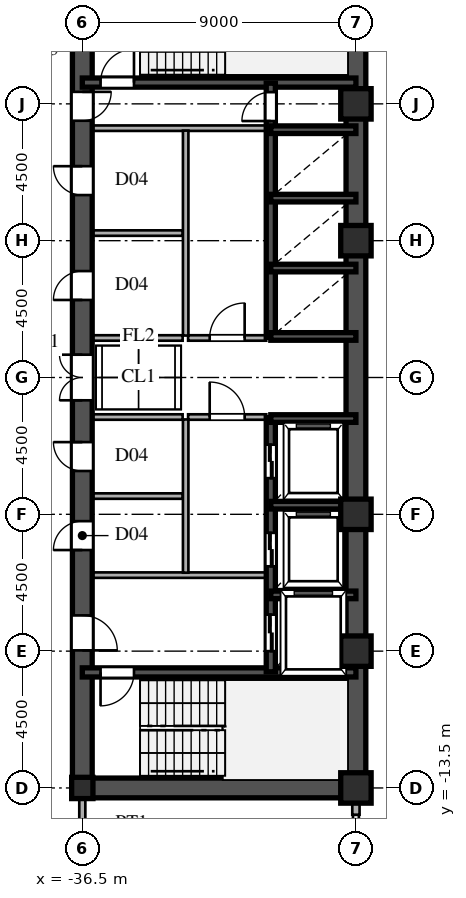
"""IFC4 building model, lengths in metres.
Left out: names, types, materials, properties, quantities, classifications, styles, units other than length and angle.
Written with IfcOpenShell. Run it as: python <this file> out.ifc"""

import sys

from ifc_helpers import new_model, si_unit, direction, frame, frame_2d, origin, origin_2d, place, context, subcontext, project, spatial, rectangle, hollow_rectangle, i_section, extrude, source, transform, mapped, element, fill, save


model = new_model("IFC4")
c1 = context("Model", 3, precision=1e-05, world=origin(), true_north=direction((0.0, 1.0)))
c2 = subcontext(c1, "Body", "Model", "MODEL_VIEW")
j1 = project(units=[si_unit("LENGTHUNIT", "METRE"), si_unit("PLANEANGLEUNIT", "RADIAN")], contexts=[c1])
p1 = place(None, origin())
s1 = spatial("IfcSite", under=j1, at=p1, CompositionType="ELEMENT")
p2 = place(p1, origin())
s2 = spatial("IfcBuilding", under=s1, at=p2, CompositionType="ELEMENT")
p3 = place(p2, frame((0.0, 0.0, 117.6)))
s3 = spatial("IfcBuildingStorey", under=s2, at=p3, CompositionType="ELEMENT", Elevation=117.6)
m1 = source(origin(), c2, "Body", "SweptSolid", [
    extrude(hollow_rectangle(XDim=1.0, YDim=1.0, WallThickness=0.042, at=origin_2d()), origin(), (0.0, 0.0, 1.0), 3.6),
])
for number, where, z_axis, x_axis in (
    (1, (-27.5, -13.5, 0.0), (0.0, 0.0, 1.0), (1.0, 0.0, 0.0)),
    (2, (-27.5, -9.0, 0.0), (0.0, 0.0, 1.0), (1.0, 0.0, 0.0)),
    (3, (-27.5, -4.5, 0.0), (0.0, 0.0, 1.0), (1.0, 0.0, 0.0)),
    (4, (-27.5, 4.5, 0.0), (0.0, 0.0, 1.0), (1.0, 0.0, 0.0)),
    (5, (-27.5, 9.0, 0.0), (0.0, 0.0, 1.0), (1.0, 0.0, 0.0)),
):
    element("IfcColumn", number, at=place(p3, frame(where, z_axis=z_axis, x_axis=x_axis)), inside=s3, PredefinedType="COLUMN", context=c2, shape_type="MappedRepresentation", body=[
        mapped(m1, transform((0.0, 0.0, 0.0), scale=1.0)),
    ])
m2 = source(origin(), c2, "Body", "SweptSolid", [
    extrude(i_section(OverallWidth=0.7, OverallDepth=0.7, WebThickness=0.028, FlangeThickness=0.045, at=origin_2d()), origin(), (0.0, 0.0, 1.0), 3.6),
])
p4 = place(p3, frame((-36.5, -13.5, 0.0), z_axis=(0.0, 0.0, 1.0), x_axis=(1.0, 0.0, 0.0)))
e6 = element("IfcColumn", 6, at=p4, inside=s3, PredefinedType="COLUMN", context=c2, shape_type="MappedRepresentation", body=[
    mapped(m2, transform((0.0, 0.0, 0.0), scale=1.0)),
])
p5 = place(p3, frame((-27.5, -14.38, 0.0), z_axis=(0.0, 0.0, 1.0), x_axis=(0.0, 1.0, 0.0)))
e7 = element("IfcWall", 7, at=p5, inside=s3, PredefinedType="SOLIDWALL", context=c2, shape_type="SweptSolid", body=[
    extrude(rectangle(XDim=0.55, YDim=0.24, at=frame_2d((0.275, 0.0))), origin(), (0.0, 0.0, 1.0), 2.88),
])
for number, where, z_axis, x_axis in (
    (8, (-27.5, -13.5, 0.0), (0.0, 0.0, 1.0), (0.0, 1.0, 0.0)),
    (9, (-27.5, 1.3, 0.0), (0.0, 0.0, 1.0), (0.0, 1.0, 0.0)),
):
    element("IfcWall", number, at=place(p3, frame(where, z_axis=z_axis, x_axis=x_axis)), inside=s3, PredefinedType="SHEAR", context=c2, shape_type="SweptSolid", body=[
        extrude(rectangle(XDim=12.2, YDim=0.65, at=frame_2d((6.1, 0.0))), origin(), (0.0, 0.0, 1.0), 3.38),
    ])
p6 = place(p3, frame((-27.5, -1.3, 0.0), z_axis=(0.0, 0.0, 1.0), x_axis=(0.0, 1.0, 0.0)))
e10 = element("IfcWall", 10, at=p6, inside=s3, PredefinedType="SHEAR", context=c2, shape_type="SweptSolid", body=[
    extrude(rectangle(XDim=2.6, YDim=0.65, at=frame_2d((1.3, 0.0))), origin(), (0.0, 0.0, 1.0), 3.38),
])
p7 = place(p3, frame((-36.5, -13.5, 0.0), z_axis=(0.0, 0.0, 1.0), x_axis=(1.0, 0.0, 0.0)))
e11 = element("IfcWall", 11, at=p7, inside=s3, PredefinedType="SHEAR", context=c2, shape_type="SweptSolid", body=[
    extrude(rectangle(XDim=9.0, YDim=0.65, at=frame_2d((4.5, 0.0))), origin(), (0.0, 0.0, 1.0), 3.38),
])
p8 = place(p3, frame((-36.5, -13.65, 0.0), z_axis=(0.0, 0.0, 1.0), x_axis=(0.0, 1.0, 0.0)))
e12 = element("IfcWall", 12, at=p8, inside=s3, PredefinedType="SHEAR", context=c2, shape_type="SweptSolid", body=[
    extrude(rectangle(XDim=7.15, YDim=0.65, at=frame_2d((3.575, 0.0))), origin(), (0.0, 0.0, 1.0), 3.38),
])
p9 = place(p8, frame((4.675, 0.0, 0.0)))
e13 = element("IfcOpeningElement", 13, at=p9, cuts=e12, PredefinedType="OPENING", context=c2, shape_type="SweptSolid", body=[
    extrude(rectangle(XDim=1.15, YDim=2.2, at=frame_2d((0.575, 1.1))), frame((0.0, 0.335, 0.0), z_axis=(0.0, -1.0, 0.0), x_axis=(1.0, 0.0, 0.0)), (0.0, 0.0, 1.0), 0.67),
])
p10 = place(p3, frame((-36.5, -1.3, 0.0), z_axis=(0.0, 0.0, 1.0), x_axis=(0.0, 1.0, 0.0)))
e14 = element("IfcWall", 14, at=p10, inside=s3, PredefinedType="SHEAR", context=c2, shape_type="SweptSolid", body=[
    extrude(rectangle(XDim=2.6, YDim=0.65, at=frame_2d((1.3, 0.0))), origin(), (0.0, 0.0, 1.0), 3.38),
])
p11 = place(p10, frame((0.55, 0.0, 0.0)))
e15 = element("IfcOpeningElement", 15, at=p11, cuts=e14, PredefinedType="OPENING", context=c2, shape_type="SweptSolid", body=[
    extrude(rectangle(XDim=1.5, YDim=2.3, at=frame_2d((0.75, 1.15))), frame((0.0, 0.335, 0.0), z_axis=(0.0, -1.0, 0.0), x_axis=(1.0, 0.0, 0.0)), (0.0, 0.0, 1.0), 0.67),
])
p12 = place(p3, frame((-36.5, 8.2, 0.0), z_axis=(0.0, 0.0, 1.0), x_axis=(0.0, 1.0, 0.0)))
e16 = element("IfcWall", 16, at=p12, inside=s3, PredefinedType="SHEAR", context=c2, shape_type="SweptSolid", body=[
    extrude(rectangle(XDim=5.45, YDim=0.65, at=frame_2d((2.725, 0.0))), origin(), (0.0, 0.0, 1.0), 3.38),
])
p13 = place(p12, frame((0.245, 0.0, 0.0)))
e17 = element("IfcOpeningElement", 17, at=p13, cuts=e16, PredefinedType="OPENING", context=c2, shape_type="SweptSolid", body=[
    extrude(rectangle(XDim=0.95, YDim=2.15, at=frame_2d((0.475, 1.075))), frame((0.0, 0.335, 0.0), z_axis=(0.0, -1.0, 0.0), x_axis=(1.0, 0.0, 0.0)), (0.0, 0.0, 1.0), 0.67),
])
p14 = place(p3, frame((-36.5, -6.5, 0.0), z_axis=(0.0, 0.0, 1.0), x_axis=(0.0, 1.0, 0.0)))
e18 = element("IfcWall", 18, at=p14, inside=s3, PredefinedType="SHEAR", context=c2, shape_type="SweptSolid", body=[
    extrude(rectangle(XDim=2.6, YDim=0.65, at=frame_2d((1.3, 0.0))), origin(), (0.0, 0.0, 1.0), 3.38),
])
p15 = place(p14, frame((0.825, 0.0, 0.0)))
e19 = element("IfcOpeningElement", 19, at=p15, cuts=e18, PredefinedType="OPENING", context=c2, shape_type="SweptSolid", body=[
    extrude(rectangle(XDim=0.95, YDim=2.15, at=frame_2d((0.475, 1.075))), frame((0.0, 0.335, 0.0), z_axis=(0.0, -1.0, 0.0), x_axis=(1.0, 0.0, 0.0)), (0.0, 0.0, 1.0), 0.67),
])
p16 = place(p3, frame((-36.5, -3.9, 0.0), z_axis=(0.0, 0.0, 1.0), x_axis=(0.0, 1.0, 0.0)))
e20 = element("IfcWall", 20, at=p16, inside=s3, PredefinedType="SHEAR", context=c2, shape_type="SweptSolid", body=[
    extrude(rectangle(XDim=2.6, YDim=0.65, at=frame_2d((1.3, 0.0))), origin(), (0.0, 0.0, 1.0), 3.38),
])
p17 = place(p16, frame((0.825, 0.0, 0.0)))
e21 = element("IfcOpeningElement", 21, at=p17, cuts=e20, PredefinedType="OPENING", context=c2, shape_type="SweptSolid", body=[
    extrude(rectangle(XDim=0.95, YDim=2.15, at=frame_2d((0.475, 1.075))), frame((0.0, 0.335, 0.0), z_axis=(0.0, -1.0, 0.0), x_axis=(1.0, 0.0, 0.0)), (0.0, 0.0, 1.0), 0.67),
])
p18 = place(p3, frame((-36.5, 1.3, 0.0), z_axis=(0.0, 0.0, 1.0), x_axis=(0.0, 1.0, 0.0)))
e22 = element("IfcWall", 22, at=p18, inside=s3, PredefinedType="SHEAR", context=c2, shape_type="SweptSolid", body=[
    extrude(rectangle(XDim=3.45, YDim=0.65, at=frame_2d((1.725, 0.0))), origin(), (0.0, 0.0, 1.0), 3.38),
])
p19 = place(p18, frame((1.25, 0.0, 0.0)))
e23 = element("IfcOpeningElement", 23, at=p19, cuts=e22, PredefinedType="OPENING", context=c2, shape_type="SweptSolid", body=[
    extrude(rectangle(XDim=0.95, YDim=2.15, at=frame_2d((0.475, 1.075))), frame((0.0, 0.335, 0.0), z_axis=(0.0, -1.0, 0.0), x_axis=(1.0, 0.0, 0.0)), (0.0, 0.0, 1.0), 0.67),
])
p20 = place(p3, frame((-36.5, 4.75, 0.0), z_axis=(0.0, 0.0, 1.0), x_axis=(0.0, 1.0, 0.0)))
e24 = element("IfcWall", 24, at=p20, inside=s3, PredefinedType="SHEAR", context=c2, shape_type="SweptSolid", body=[
    extrude(rectangle(XDim=3.45, YDim=0.65, at=frame_2d((1.725, 0.0))), origin(), (0.0, 0.0, 1.0), 3.38),
])
p21 = place(p20, frame((1.25, 0.0, 0.0)))
e25 = element("IfcOpeningElement", 25, at=p21, cuts=e24, PredefinedType="OPENING", context=c2, shape_type="SweptSolid", body=[
    extrude(rectangle(XDim=0.95, YDim=2.15, at=frame_2d((0.475, 1.075))), frame((0.0, 0.335, 0.0), z_axis=(0.0, -1.0, 0.0), x_axis=(1.0, 0.0, 0.0)), (0.0, 0.0, 1.0), 0.67),
])
p22 = place(p3, frame((-36.5, -9.7, 0.0), z_axis=(0.0, 0.0, 1.0), x_axis=(1.0, 0.0, 0.0)))
e26 = element("IfcWall", 26, at=p22, inside=s3, PredefinedType="SHEAR", context=c2, shape_type="SweptSolid", body=[
    extrude(rectangle(XDim=9.0, YDim=0.3, at=frame_2d((4.5, 0.0))), origin(), (0.0, 0.0, 1.0), 3.38),
])
p23 = place(p22, frame((0.6, 0.0, 0.0)))
e27 = element("IfcOpeningElement", 27, at=p23, cuts=e26, PredefinedType="OPENING", context=c2, shape_type="SweptSolid", body=[
    extrude(rectangle(XDim=1.1, YDim=2.2, at=frame_2d((0.55, 1.1))), frame((0.0, 0.16, 0.0), z_axis=(0.0, -1.0, 0.0), x_axis=(1.0, 0.0, 0.0)), (0.0, 0.0, 1.0), 0.32),
])
p24 = place(p3, frame((-36.5, 9.7, 0.0), z_axis=(0.0, 0.0, 1.0), x_axis=(1.0, 0.0, 0.0)))
e28 = element("IfcWall", 28, at=p24, inside=s3, PredefinedType="SHEAR", context=c2, shape_type="SweptSolid", body=[
    extrude(rectangle(XDim=9.0, YDim=0.3, at=frame_2d((4.5, 0.0))), origin(), (0.0, 0.0, 1.0), 3.38),
])
p25 = place(p24, frame((0.6, 0.0, 0.0)))
e29 = element("IfcOpeningElement", 29, at=p25, cuts=e28, PredefinedType="OPENING", context=c2, shape_type="SweptSolid", body=[
    extrude(rectangle(XDim=1.1, YDim=2.2, at=frame_2d((0.55, 1.1))), frame((0.0, 0.16, 0.0), z_axis=(0.0, -1.0, 0.0), x_axis=(1.0, 0.0, 0.0)), (0.0, 0.0, 1.0), 0.32),
])
for number, where, z_axis, x_axis in (
    (30, (-30.3, -7.15, 0.0), (0.0, 0.0, 1.0), (1.0, 0.0, 0.0)),
    (31, (-30.3, -4.2, 0.0), (0.0, 0.0, 1.0), (1.0, 0.0, 0.0)),
    (32, (-30.3, -1.35, 0.0), (0.0, 0.0, 1.0), (1.0, 0.0, 0.0)),
    (33, (-30.3, 1.35, 0.0), (0.0, 0.0, 1.0), (1.0, 0.0, 0.0)),
    (34, (-30.3, 3.6, 0.0), (0.0, 0.0, 1.0), (1.0, 0.0, 0.0)),
    (35, (-30.3, 5.9, 0.0), (0.0, 0.0, 1.0), (1.0, 0.0, 0.0)),
    (36, (-30.3, 8.15, 0.0), (0.0, 0.0, 1.0), (1.0, 0.0, 0.0)),
):
    element("IfcWall", number, at=place(p3, frame(where, z_axis=z_axis, x_axis=x_axis)), inside=s3, PredefinedType="SHEAR", context=c2, shape_type="SweptSolid", body=[
        extrude(rectangle(XDim=2.8, YDim=0.25, at=frame_2d((1.4, 0.0))), origin(), (0.0, 0.0, 1.0), 3.38),
    ])
p26 = place(p3, frame((-30.3, -9.68, 0.0), z_axis=(0.0, 0.0, 1.0), x_axis=(0.0, 1.0, 0.0)))
e37 = element("IfcWall", 37, at=p26, inside=s3, PredefinedType="SHEAR", context=c2, shape_type="SweptSolid", body=[
    extrude(rectangle(XDim=2.56, YDim=0.3, at=frame_2d((1.28, 0.0))), origin(), (0.0, 0.0, 1.0), 3.38),
])
p27 = place(p26, frame((0.68, 0.0, 0.0)))
e38 = element("IfcOpeningElement", 38, at=p27, cuts=e37, PredefinedType="OPENING", context=c2, shape_type="SweptSolid", body=[
    extrude(rectangle(XDim=1.2, YDim=2.25, at=frame_2d((0.6, 1.125))), frame((0.0, 0.16, 0.0), z_axis=(0.0, -1.0, 0.0), x_axis=(1.0, 0.0, 0.0)), (0.0, 0.0, 1.0), 0.32),
])
p28 = place(p3, frame((-30.3, -7.12, 0.0), z_axis=(0.0, 0.0, 1.0), x_axis=(0.0, 1.0, 0.0)))
e39 = element("IfcWall", 39, at=p28, inside=s3, PredefinedType="SHEAR", context=c2, shape_type="SweptSolid", body=[
    extrude(rectangle(XDim=2.92, YDim=0.3, at=frame_2d((1.46, 0.0))), origin(), (0.0, 0.0, 1.0), 3.38),
])
p29 = place(p28, frame((0.91, 0.0, 0.0)))
e40 = element("IfcOpeningElement", 40, at=p29, cuts=e39, PredefinedType="OPENING", context=c2, shape_type="SweptSolid", body=[
    extrude(rectangle(XDim=1.1, YDim=2.2, at=frame_2d((0.55, 1.1))), frame((0.0, 0.16, 0.0), z_axis=(0.0, -1.0, 0.0), x_axis=(1.0, 0.0, 0.0)), (0.0, 0.0, 1.0), 0.32),
])
p30 = place(p3, frame((-30.3, -4.2, 0.0), z_axis=(0.0, 0.0, 1.0), x_axis=(0.0, 1.0, 0.0)))
e41 = element("IfcWall", 41, at=p30, inside=s3, PredefinedType="SHEAR", context=c2, shape_type="SweptSolid", body=[
    extrude(rectangle(XDim=2.88, YDim=0.3, at=frame_2d((1.44, 0.0))), origin(), (0.0, 0.0, 1.0), 3.38),
])
p31 = place(p30, frame((0.89, 0.0, 0.0)))
e42 = element("IfcOpeningElement", 42, at=p31, cuts=e41, PredefinedType="OPENING", context=c2, shape_type="SweptSolid", body=[
    extrude(rectangle(XDim=1.1, YDim=2.2, at=frame_2d((0.55, 1.1))), frame((0.0, 0.16, 0.0), z_axis=(0.0, -1.0, 0.0), x_axis=(1.0, 0.0, 0.0)), (0.0, 0.0, 1.0), 0.32),
])
p32 = place(p3, frame((-30.3, 1.32, 0.0), z_axis=(0.0, 0.0, 1.0), x_axis=(0.0, 1.0, 0.0)))
e43 = element("IfcWall", 43, at=p32, inside=s3, PredefinedType="SHEAR", context=c2, shape_type="SweptSolid", body=[
    extrude(rectangle(XDim=2.28, YDim=0.3, at=frame_2d((1.14, 0.0))), origin(), (0.0, 0.0, 1.0), 3.38),
])
p33 = place(p3, frame((-30.3, 3.6, 0.0), z_axis=(0.0, 0.0, 1.0), x_axis=(0.0, 1.0, 0.0)))
e44 = element("IfcWall", 44, at=p33, inside=s3, PredefinedType="SHEAR", context=c2, shape_type="SweptSolid", body=[
    extrude(rectangle(XDim=2.3, YDim=0.3, at=frame_2d((1.15, 0.0))), origin(), (0.0, 0.0, 1.0), 3.38),
])
p34 = place(p3, frame((-30.3, 5.9, 0.0), z_axis=(0.0, 0.0, 1.0), x_axis=(0.0, 1.0, 0.0)))
e45 = element("IfcWall", 45, at=p34, inside=s3, PredefinedType="SHEAR", context=c2, shape_type="SweptSolid", body=[
    extrude(rectangle(XDim=2.25, YDim=0.3, at=frame_2d((1.125, 0.0))), origin(), (0.0, 0.0, 1.0), 3.38),
])
p35 = place(p3, frame((-30.3, 8.15, 0.0), z_axis=(0.0, 0.0, 1.0), x_axis=(0.0, 1.0, 0.0)))
e46 = element("IfcWall", 46, at=p35, inside=s3, PredefinedType="SHEAR", context=c2, shape_type="SweptSolid", body=[
    extrude(rectangle(XDim=1.53, YDim=0.3, at=frame_2d((0.765, 0.0))), origin(), (0.0, 0.0, 1.0), 3.38),
])
p36 = place(p35, frame((0.285, 0.0, 0.0)))
e47 = element("IfcOpeningElement", 47, at=p36, cuts=e46, PredefinedType="OPENING", context=c2, shape_type="SweptSolid", body=[
    extrude(rectangle(XDim=0.95, YDim=2.15, at=frame_2d((0.475, 1.075))), frame((0.0, 0.16, 0.0), z_axis=(0.0, -1.0, 0.0), x_axis=(1.0, 0.0, 0.0)), (0.0, 0.0, 1.0), 0.32),
])
for number, where, z_axis, x_axis in (
    (48, (-36.15, -6.5, 0.0), (0.0, 0.0, 1.0), (1.0, 0.0, 0.0)),
    (49, (-36.15, 8.2, 0.0), (0.0, 0.0, 1.0), (1.0, 0.0, 0.0)),
):
    element("IfcWall", number, at=place(p3, frame(where, z_axis=z_axis, x_axis=x_axis)), inside=s3, PredefinedType="PARTITIONING", context=c2, shape_type="SweptSolid", body=[
        extrude(rectangle(XDim=5.7, YDim=0.18, at=frame_2d((2.85, 0.0))), origin(), (0.0, 0.0, 1.0), 3.38),
    ])
p37 = place(p3, frame((-33.1, -6.42, 0.0), z_axis=(0.0, 0.0, 1.0), x_axis=(0.0, 1.0, 0.0)))
e50 = element("IfcWall", 50, at=p37, inside=s3, PredefinedType="PARTITIONING", context=c2, shape_type="SweptSolid", body=[
    extrude(rectangle(XDim=5.04, YDim=0.18, at=frame_2d((2.52, 0.0))), origin(), (0.0, 0.0, 1.0), 3.38),
])
p38 = place(p3, frame((-33.1, 1.38, 0.0), z_axis=(0.0, 0.0, 1.0), x_axis=(0.0, 1.0, 0.0)))
e51 = element("IfcWall", 51, at=p38, inside=s3, PredefinedType="PARTITIONING", context=c2, shape_type="SweptSolid", body=[
    extrude(rectangle(XDim=6.74, YDim=0.18, at=frame_2d((3.37, 0.0))), origin(), (0.0, 0.0, 1.0), 3.38),
])
p39 = place(p3, frame((-33.02, -1.3, 0.0), z_axis=(0.0, 0.0, 1.0), x_axis=(1.0, 0.0, 0.0)))
e52 = element("IfcWall", 52, at=p39, inside=s3, PredefinedType="PARTITIONING", context=c2, shape_type="SweptSolid", body=[
    extrude(rectangle(XDim=2.57, YDim=0.18, at=frame_2d((1.285, 0.0))), origin(), (0.0, 0.0, 1.0), 3.38),
])
p40 = place(p39, frame((0.71, 0.0, 0.0)))
e53 = element("IfcOpeningElement", 53, at=p40, cuts=e52, PredefinedType="OPENING", context=c2, shape_type="SweptSolid", body=[
    extrude(rectangle(XDim=1.15, YDim=2.2, at=frame_2d((0.575, 1.1))), frame((0.0, 0.1, 0.0), z_axis=(0.0, -1.0, 0.0), x_axis=(1.0, 0.0, 0.0)), (0.0, 0.0, 1.0), 0.2),
])
p41 = place(p3, frame((-33.02, 1.3, 0.0), z_axis=(0.0, 0.0, 1.0), x_axis=(1.0, 0.0, 0.0)))
e54 = element("IfcWall", 54, at=p41, inside=s3, PredefinedType="PARTITIONING", context=c2, shape_type="SweptSolid", body=[
    extrude(rectangle(XDim=2.57, YDim=0.18, at=frame_2d((1.285, 0.0))), origin(), (0.0, 0.0, 1.0), 3.38),
])
p42 = place(p41, frame((0.71, 0.0, 0.0)))
e55 = element("IfcOpeningElement", 55, at=p42, cuts=e54, PredefinedType="OPENING", context=c2, shape_type="SweptSolid", body=[
    extrude(rectangle(XDim=1.15, YDim=2.2, at=frame_2d((0.575, 1.1))), frame((0.0, 0.1, 0.0), z_axis=(0.0, -1.0, 0.0), x_axis=(1.0, 0.0, 0.0)), (0.0, 0.0, 1.0), 0.2),
])
for number, where, z_axis, x_axis in (
    (56, (-36.15, -1.3, 0.0), (0.0, 0.0, 1.0), (1.0, 0.0, 0.0)),
    (57, (-36.15, 1.3, 0.0), (0.0, 0.0, 1.0), (1.0, 0.0, 0.0)),
    (58, (-36.15, -3.9, 0.0), (0.0, 0.0, 1.0), (1.0, 0.0, 0.0)),
    (59, (-36.15, 4.75, 0.0), (0.0, 0.0, 1.0), (1.0, 0.0, 0.0)),
):
    element("IfcWall", number, at=place(p3, frame(where, z_axis=z_axis, x_axis=x_axis)), inside=s3, PredefinedType="PARTITIONING", context=c2, shape_type="SweptSolid", body=[
        extrude(rectangle(XDim=2.95, YDim=0.18, at=frame_2d((1.475, 0.0))), origin(), (0.0, 0.0, 1.0), 3.38),
    ])
p43 = place(p3, frame((-36.5, -15.515, 0.0), z_axis=(0.0, 0.0, 1.0), x_axis=(0.0, 1.0, 0.0)))
e60 = element("IfcWall", 60, at=p43, inside=s3, PredefinedType="PARTITIONING", context=c2, shape_type="SweptSolid", body=[
    extrude(rectangle(XDim=1.685, YDim=0.2, at=frame_2d((0.842, 0.0))), origin(), (0.0, 0.0, 1.0), 2.78),
])
m3 = source(origin(), c2, "Body", "SweptSolid", [
    extrude(rectangle(XDim=1.15, YDim=2.2, at=frame_2d((0.575, 1.1))), frame((0.0, 0.025, 0.0), z_axis=(0.0, -1.0, 0.0), x_axis=(1.0, 0.0, 0.0)), (0.0, 0.0, 1.0), 0.05),
])
p44 = place(p9, frame((1.15, 0.0, 0.0), z_axis=(0.0, 0.0, 1.0), x_axis=(-1.0, 0.0, 0.0)))
e61 = element("IfcDoor", 61, at=p44, inside=s3, OperationType="SINGLE_SWING_LEFT", PredefinedType="DOOR", context=c2, shape_type="MappedRepresentation", body=[
    mapped(m3, transform((0.0, 0.0, 0.0), scale=1.0)),
])
fill(e13, e61)
m4 = source(origin(), c2, "Body", "SweptSolid", [
    extrude(rectangle(XDim=1.5, YDim=2.3, at=frame_2d((0.75, 1.15))), frame((0.0, 0.025, 0.0), z_axis=(0.0, -1.0, 0.0), x_axis=(1.0, 0.0, 0.0)), (0.0, 0.0, 1.0), 0.05),
])
p45 = place(p11, origin())
e62 = element("IfcDoor", 62, at=p45, inside=s3, OperationType="DOUBLE_SWING_LEFT", PredefinedType="DOOR", context=c2, shape_type="MappedRepresentation", body=[
    mapped(m4, transform((0.0, 0.0, 0.0), scale=1.0)),
])
fill(e15, e62)
m5 = source(origin(), c2, "Body", "SweptSolid", [
    extrude(rectangle(XDim=0.95, YDim=2.15, at=frame_2d((0.475, 1.075))), frame((0.0, 0.025, 0.0), z_axis=(0.0, -1.0, 0.0), x_axis=(1.0, 0.0, 0.0)), (0.0, 0.0, 1.0), 0.05),
])
p46 = place(p13, frame((0.95, 0.0, 0.0), z_axis=(0.0, 0.0, 1.0), x_axis=(-1.0, 0.0, 0.0)))
e63 = element("IfcDoor", 63, at=p46, inside=s3, OperationType="SINGLE_SWING_RIGHT", PredefinedType="DOOR", context=c2, shape_type="MappedRepresentation", body=[
    mapped(m5, transform((0.0, 0.0, 0.0), scale=1.0)),
])
fill(e17, e63)
p47 = place(p15, origin())
e64 = element("IfcDoor", 64, at=p47, inside=s3, OperationType="SINGLE_SWING_LEFT", PredefinedType="DOOR", context=c2, shape_type="MappedRepresentation", body=[
    mapped(m5, transform((0.0, 0.0, 0.0), scale=1.0)),
])
fill(e19, e64)
p48 = place(p17, origin())
e65 = element("IfcDoor", 65, at=p48, inside=s3, OperationType="SINGLE_SWING_RIGHT", PredefinedType="DOOR", context=c2, shape_type="MappedRepresentation", body=[
    mapped(m5, transform((0.0, 0.0, 0.0), scale=1.0)),
])
fill(e21, e65)
p49 = place(p19, origin())
e66 = element("IfcDoor", 66, at=p49, inside=s3, OperationType="SINGLE_SWING_LEFT", PredefinedType="DOOR", context=c2, shape_type="MappedRepresentation", body=[
    mapped(m5, transform((0.0, 0.0, 0.0), scale=1.0)),
])
fill(e23, e66)
p50 = place(p21, origin())
e67 = element("IfcDoor", 67, at=p50, inside=s3, OperationType="SINGLE_SWING_RIGHT", PredefinedType="DOOR", context=c2, shape_type="MappedRepresentation", body=[
    mapped(m5, transform((0.0, 0.0, 0.0), scale=1.0)),
])
fill(e25, e67)
m6 = source(origin(), c2, "Body", "SweptSolid", [
    extrude(rectangle(XDim=1.1, YDim=2.2, at=frame_2d((0.55, 1.1))), frame((0.0, 0.025, 0.0), z_axis=(0.0, -1.0, 0.0), x_axis=(1.0, 0.0, 0.0)), (0.0, 0.0, 1.0), 0.05),
])
p51 = place(p23, frame((1.1, 0.0, 0.0), z_axis=(0.0, 0.0, 1.0), x_axis=(-1.0, 0.0, 0.0)))
e68 = element("IfcDoor", 68, at=p51, inside=s3, OperationType="SINGLE_SWING_LEFT", PredefinedType="DOOR", context=c2, shape_type="MappedRepresentation", body=[
    mapped(m6, transform((0.0, 0.0, 0.0), scale=1.0)),
])
fill(e27, e68)
p52 = place(p25, origin())
e69 = element("IfcDoor", 69, at=p52, inside=s3, OperationType="SINGLE_SWING_RIGHT", PredefinedType="DOOR", context=c2, shape_type="MappedRepresentation", body=[
    mapped(m6, transform((0.0, 0.0, 0.0), scale=1.0)),
])
fill(e29, e69)
m7 = source(origin(), c2, "Body", "SweptSolid", [
    extrude(rectangle(XDim=1.2, YDim=2.25, at=frame_2d((0.6, 1.125))), frame((0.0, 0.025, 0.0), z_axis=(0.0, -1.0, 0.0), x_axis=(1.0, 0.0, 0.0)), (0.0, 0.0, 1.0), 0.05),
])
p53 = place(p27, origin())
e70 = element("IfcDoor", 70, at=p53, inside=s3, OperationType="DOUBLE_DOOR_SLIDING", PredefinedType="DOOR", context=c2, shape_type="MappedRepresentation", body=[
    mapped(m7, transform((0.0, 0.0, 0.0), scale=1.0)),
])
fill(e38, e70)
m8 = source(origin(), c2, "Body", "SweptSolid", [
    extrude(rectangle(XDim=1.1, YDim=2.2, at=frame_2d((0.55, 1.1))), frame((0.0, 0.025, 0.0), z_axis=(0.0, -1.0, 0.0), x_axis=(1.0, 0.0, 0.0)), (0.0, 0.0, 1.0), 0.05),
])
p54 = place(p29, origin())
e71 = element("IfcDoor", 71, at=p54, inside=s3, OperationType="DOUBLE_DOOR_SLIDING", PredefinedType="DOOR", context=c2, shape_type="MappedRepresentation", body=[
    mapped(m8, transform((0.0, 0.0, 0.0), scale=1.0)),
])
fill(e40, e71)
p55 = place(p31, origin())
e72 = element("IfcDoor", 72, at=p55, inside=s3, OperationType="DOUBLE_DOOR_SLIDING", PredefinedType="DOOR", context=c2, shape_type="MappedRepresentation", body=[
    mapped(m8, transform((0.0, 0.0, 0.0), scale=1.0)),
])
fill(e42, e72)
p56 = place(p36, origin())
e73 = element("IfcDoor", 73, at=p56, inside=s3, OperationType="SINGLE_SWING_LEFT", PredefinedType="DOOR", context=c2, shape_type="MappedRepresentation", body=[
    mapped(m5, transform((0.0, 0.0, 0.0), scale=1.0)),
])
fill(e47, e73)
p57 = place(p40, origin())
e74 = element("IfcDoor", 74, at=p57, inside=s3, OperationType="SINGLE_SWING_LEFT", PredefinedType="DOOR", context=c2, shape_type="MappedRepresentation", body=[
    mapped(m3, transform((0.0, 0.0, 0.0), scale=1.0)),
])
fill(e53, e74)
p58 = place(p42, origin())
e75 = element("IfcDoor", 75, at=p58, inside=s3, OperationType="SINGLE_SWING_RIGHT", PredefinedType="DOOR", context=c2, shape_type="MappedRepresentation", body=[
    mapped(m3, transform((0.0, 0.0, 0.0), scale=1.0)),
])
fill(e55, e75)
save(model, sys.argv[1])
